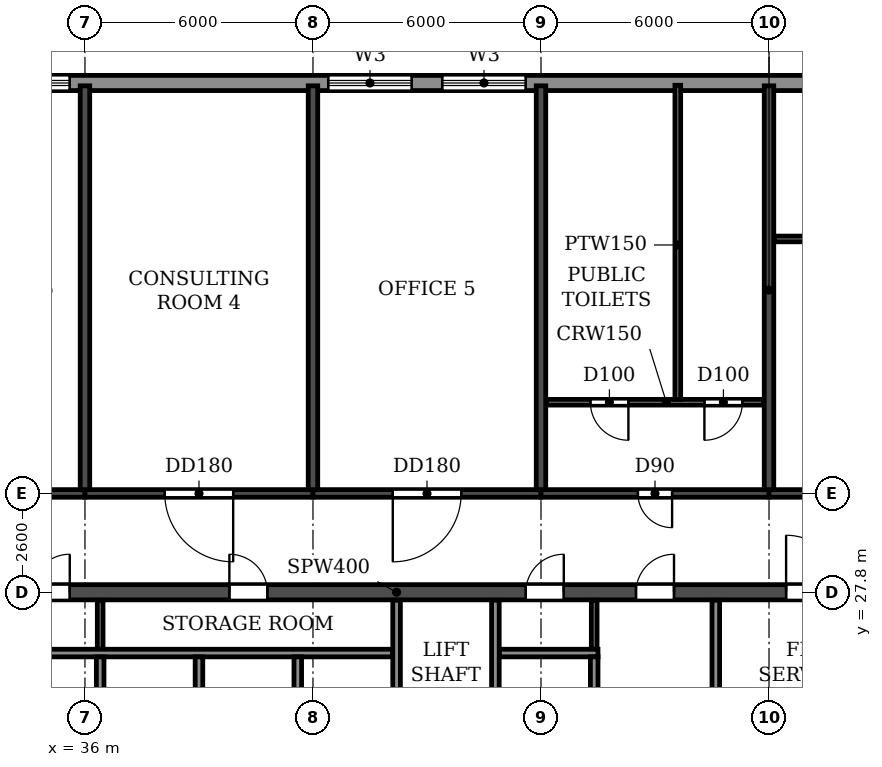
"""IFC4 building model, lengths in metres.
Left out: names, types, materials, properties, quantities, classifications, styles, units other than length and angle.
Written with IfcOpenShell. Run it as: python <this file> out.ifc"""

import sys

from ifc_helpers import new_model, si_unit, direction, frame, frame_2d, origin, place, context, subcontext, project, spatial, rectangle, extrude, element, fill, save


model = new_model("IFC4")
c1 = context("Model", 3, precision=1e-05, world=origin(), true_north=direction((0.0, 1.0)))
c2 = subcontext(c1, "Body", "Model", "MODEL_VIEW")
j1 = project(units=[si_unit("LENGTHUNIT", "METRE"), si_unit("PLANEANGLEUNIT", "RADIAN")], contexts=[c1])
p1 = place(None, origin())
s1 = spatial("IfcSite", under=j1, at=p1, CompositionType="ELEMENT")
p2 = place(p1, origin())
s2 = spatial("IfcBuilding", under=s1, at=p2, CompositionType="ELEMENT")
p3 = place(p2, frame((0.0, 0.0, 211.5)))
s3 = spatial("IfcBuildingStorey", under=s2, at=p3, CompositionType="ELEMENT", Elevation=211.5)
for number, where, z_axis, x_axis in (
    (1, (36.0, 30.5, 0.0), (0.0, 0.0, 1.0), (0.0, 1.0, 0.0)),
    (2, (42.0, 30.5, 0.0), (0.0, 0.0, 1.0), (0.0, 1.0, 0.0)),
    (3, (48.0, 30.5, 0.0), (0.0, 0.0, 1.0), (0.0, 1.0, 0.0)),
    (4, (54.0, 30.5, 0.0), (0.0, 0.0, 1.0), (0.0, 1.0, 0.0)),
):
    element("IfcWall", number, at=place(p3, frame(where, z_axis=z_axis, x_axis=x_axis)), inside=s3, PredefinedType="SHEAR", context=c2, shape_type="SweptSolid", body=[
        extrude(rectangle(XDim=10.625, YDim=0.25, at=frame_2d((5.312, 0.0))), origin(), (0.0, 0.0, 1.0), 2.95),
    ])
p4 = place(p3, frame((30.0, 30.4, 0.0), z_axis=(0.0, 0.0, 1.0), x_axis=(1.0, 0.0, 0.0)))
e5 = element("IfcWall", 5, at=p4, inside=s3, PredefinedType="SHEAR", context=c2, shape_type="SweptSolid", body=[
    extrude(rectangle(XDim=6.0, YDim=0.2, at=frame_2d((3.0, 0.0))), origin(), (0.0, 0.0, 1.0), 2.35),
])
p5 = place(p4, frame((2.1, 0.0, 0.0)))
e6 = element("IfcOpeningElement", 6, at=p5, cuts=e5, PredefinedType="OPENING", context=c2, shape_type="SweptSolid", body=[
    extrude(rectangle(XDim=1.8, YDim=2.1, at=frame_2d((0.9, 1.05))), frame((0.0, 0.11, 0.0), z_axis=(0.0, -1.0, 0.0), x_axis=(1.0, 0.0, 0.0)), (0.0, 0.0, 1.0), 0.22),
])
p6 = place(p3, frame((36.0, 30.4, 0.0), z_axis=(0.0, 0.0, 1.0), x_axis=(1.0, 0.0, 0.0)))
e7 = element("IfcWall", 7, at=p6, inside=s3, PredefinedType="SHEAR", context=c2, shape_type="SweptSolid", body=[
    extrude(rectangle(XDim=6.0, YDim=0.2, at=frame_2d((3.0, 0.0))), origin(), (0.0, 0.0, 1.0), 2.35),
])
p7 = place(p6, frame((2.1, 0.0, 0.0)))
e8 = element("IfcOpeningElement", 8, at=p7, cuts=e7, PredefinedType="OPENING", context=c2, shape_type="SweptSolid", body=[
    extrude(rectangle(XDim=1.8, YDim=2.1, at=frame_2d((0.9, 1.05))), frame((0.0, 0.11, 0.0), z_axis=(0.0, -1.0, 0.0), x_axis=(1.0, 0.0, 0.0)), (0.0, 0.0, 1.0), 0.22),
])
p8 = place(p3, frame((42.0, 30.4, 0.0), z_axis=(0.0, 0.0, 1.0), x_axis=(1.0, 0.0, 0.0)))
e9 = element("IfcWall", 9, at=p8, inside=s3, PredefinedType="SHEAR", context=c2, shape_type="SweptSolid", body=[
    extrude(rectangle(XDim=6.0, YDim=0.2, at=frame_2d((3.0, 0.0))), origin(), (0.0, 0.0, 1.0), 2.35),
])
p9 = place(p8, frame((2.1, 0.0, 0.0)))
e10 = element("IfcOpeningElement", 10, at=p9, cuts=e9, PredefinedType="OPENING", context=c2, shape_type="SweptSolid", body=[
    extrude(rectangle(XDim=1.8, YDim=2.1, at=frame_2d((0.9, 1.05))), frame((0.0, 0.11, 0.0), z_axis=(0.0, -1.0, 0.0), x_axis=(1.0, 0.0, 0.0)), (0.0, 0.0, 1.0), 0.22),
])
p10 = place(p3, frame((48.0, 30.4, 0.0), z_axis=(0.0, 0.0, 1.0), x_axis=(1.0, 0.0, 0.0)))
e11 = element("IfcWall", 11, at=p10, inside=s3, PredefinedType="SHEAR", context=c2, shape_type="SweptSolid", body=[
    extrude(rectangle(XDim=6.0, YDim=0.2, at=frame_2d((3.0, 0.0))), origin(), (0.0, 0.0, 1.0), 2.35),
])
p11 = place(p10, frame((2.55, 0.0, 0.0)))
e12 = element("IfcOpeningElement", 12, at=p11, cuts=e11, PredefinedType="OPENING", context=c2, shape_type="SweptSolid", body=[
    extrude(rectangle(XDim=0.9, YDim=2.1, at=frame_2d((0.45, 1.05))), frame((0.0, 0.11, 0.0), z_axis=(0.0, -1.0, 0.0), x_axis=(1.0, 0.0, 0.0)), (0.0, 0.0, 1.0), 0.22),
])
p12 = place(p3, frame((54.0, 30.4, 0.0), z_axis=(0.0, 0.0, 1.0), x_axis=(1.0, 0.0, 0.0)))
e13 = element("IfcWall", 13, at=p12, inside=s3, PredefinedType="SHEAR", context=c2, shape_type="SweptSolid", body=[
    extrude(rectangle(XDim=6.0, YDim=0.2, at=frame_2d((3.0, 0.0))), origin(), (0.0, 0.0, 1.0), 2.35),
])
p13 = place(p12, frame((2.5, 0.0, 0.0)))
e14 = element("IfcOpeningElement", 14, at=p13, cuts=e13, PredefinedType="OPENING", context=c2, shape_type="SweptSolid", body=[
    extrude(rectangle(XDim=1.0, YDim=2.1, at=frame_2d((0.5, 1.05))), frame((0.0, 0.11, 0.0), z_axis=(0.0, -1.0, 0.0), x_axis=(1.0, 0.0, 0.0)), (0.0, 0.0, 1.0), 0.22),
])
p14 = place(p3, frame((18.2, 27.8, 0.0), z_axis=(0.0, 0.0, 1.0), x_axis=(1.0, 0.0, 0.0)))
e15 = element("IfcWall", 15, at=p14, inside=s3, PredefinedType="SOLIDWALL", context=c2, shape_type="SweptSolid", body=[
    extrude(rectangle(XDim=65.6, YDim=0.4, at=frame_2d((32.8, 0.0))), origin(), (0.0, 0.0, 1.0), 2.95),
])
p15 = place(p14, frame((0.7, 0.0, 0.0)))
e16 = element("IfcOpeningElement", 16, at=p15, cuts=e15, PredefinedType="OPENING", context=c2, shape_type="SweptSolid", body=[
    extrude(rectangle(XDim=1.0, YDim=2.1, at=frame_2d((0.5, 1.05))), frame((0.0, 0.21, 0.0), z_axis=(0.0, -1.0, 0.0), x_axis=(1.0, 0.0, 0.0)), (0.0, 0.0, 1.0), 0.42),
])
p16 = place(p14, frame((4.05, 0.0, 0.0)))
e17 = element("IfcOpeningElement", 17, at=p16, cuts=e15, PredefinedType="OPENING", context=c2, shape_type="SweptSolid", body=[
    extrude(rectangle(XDim=0.9, YDim=2.1, at=frame_2d((0.45, 1.05))), frame((0.0, 0.21, 0.0), z_axis=(0.0, -1.0, 0.0), x_axis=(1.0, 0.0, 0.0)), (0.0, 0.0, 1.0), 0.42),
])
p17 = place(p14, frame((8.65, 0.0, 0.0)))
e18 = element("IfcOpeningElement", 18, at=p17, cuts=e15, PredefinedType="OPENING", context=c2, shape_type="SweptSolid", body=[
    extrude(rectangle(XDim=0.9, YDim=2.1, at=frame_2d((0.45, 1.05))), frame((0.0, 0.21, 0.0), z_axis=(0.0, -1.0, 0.0), x_axis=(1.0, 0.0, 0.0)), (0.0, 0.0, 1.0), 0.42),
])
p18 = place(p14, frame((13.25, 0.0, 0.0)))
e19 = element("IfcOpeningElement", 19, at=p18, cuts=e15, PredefinedType="OPENING", context=c2, shape_type="SweptSolid", body=[
    extrude(rectangle(XDim=0.9, YDim=2.1, at=frame_2d((0.45, 1.05))), frame((0.0, 0.21, 0.0), z_axis=(0.0, -1.0, 0.0), x_axis=(1.0, 0.0, 0.0)), (0.0, 0.0, 1.0), 0.42),
])
p19 = place(p14, frame((16.4, 0.0, 0.0)))
e20 = element("IfcOpeningElement", 20, at=p19, cuts=e15, PredefinedType="OPENING", context=c2, shape_type="SweptSolid", body=[
    extrude(rectangle(XDim=1.0, YDim=2.1, at=frame_2d((0.5, 1.05))), frame((0.0, 0.21, 0.0), z_axis=(0.0, -1.0, 0.0), x_axis=(1.0, 0.0, 0.0)), (0.0, 0.0, 1.0), 0.42),
])
p20 = place(p14, frame((21.6, 0.0, 0.0)))
e21 = element("IfcOpeningElement", 21, at=p20, cuts=e15, PredefinedType="OPENING", context=c2, shape_type="SweptSolid", body=[
    extrude(rectangle(XDim=1.0, YDim=2.1, at=frame_2d((0.5, 1.05))), frame((0.0, 0.21, 0.0), z_axis=(0.0, -1.0, 0.0), x_axis=(1.0, 0.0, 0.0)), (0.0, 0.0, 1.0), 0.42),
])
p21 = place(p14, frame((29.4, 0.0, 0.0)))
e22 = element("IfcOpeningElement", 22, at=p21, cuts=e15, PredefinedType="OPENING", context=c2, shape_type="SweptSolid", body=[
    extrude(rectangle(XDim=1.0, YDim=2.1, at=frame_2d((0.5, 1.05))), frame((0.0, 0.21, 0.0), z_axis=(0.0, -1.0, 0.0), x_axis=(1.0, 0.0, 0.0)), (0.0, 0.0, 1.0), 0.42),
])
p22 = place(p14, frame((32.3, 0.0, 0.0)))
e23 = element("IfcOpeningElement", 23, at=p22, cuts=e15, PredefinedType="OPENING", context=c2, shape_type="SweptSolid", body=[
    extrude(rectangle(XDim=1.0, YDim=2.1, at=frame_2d((0.5, 1.05))), frame((0.0, 0.21, 0.0), z_axis=(0.0, -1.0, 0.0), x_axis=(1.0, 0.0, 0.0)), (0.0, 0.0, 1.0), 0.42),
])
p23 = place(p14, frame((36.25, 0.0, 0.0)))
e24 = element("IfcOpeningElement", 24, at=p23, cuts=e15, PredefinedType="OPENING", context=c2, shape_type="SweptSolid", body=[
    extrude(rectangle(XDim=1.5, YDim=2.1, at=frame_2d((0.75, 1.05))), frame((0.0, 0.21, 0.0), z_axis=(0.0, -1.0, 0.0), x_axis=(1.0, 0.0, 0.0)), (0.0, 0.0, 1.0), 0.42),
])
p24 = place(p14, frame((41.7, 0.0, 0.0)))
e25 = element("IfcOpeningElement", 25, at=p24, cuts=e15, PredefinedType="OPENING", context=c2, shape_type="SweptSolid", body=[
    extrude(rectangle(XDim=1.0, YDim=2.1, at=frame_2d((0.5, 1.05))), frame((0.0, 0.21, 0.0), z_axis=(0.0, -1.0, 0.0), x_axis=(1.0, 0.0, 0.0)), (0.0, 0.0, 1.0), 0.42),
])
p25 = place(p14, frame((45.6, 0.0, 0.0)))
e26 = element("IfcOpeningElement", 26, at=p25, cuts=e15, PredefinedType="OPENING", context=c2, shape_type="SweptSolid", body=[
    extrude(rectangle(XDim=1.0, YDim=2.1, at=frame_2d((0.5, 1.05))), frame((0.0, 0.21, 0.0), z_axis=(0.0, -1.0, 0.0), x_axis=(1.0, 0.0, 0.0)), (0.0, 0.0, 1.0), 0.42),
])
p26 = place(p14, frame((48.2, 0.0, 0.0)))
e27 = element("IfcOpeningElement", 27, at=p26, cuts=e15, PredefinedType="OPENING", context=c2, shape_type="SweptSolid", body=[
    extrude(rectangle(XDim=1.0, YDim=2.1, at=frame_2d((0.5, 1.05))), frame((0.0, 0.21, 0.0), z_axis=(0.0, -1.0, 0.0), x_axis=(1.0, 0.0, 0.0)), (0.0, 0.0, 1.0), 0.42),
])
p27 = place(p14, frame((51.45, 0.0, 0.0)))
e28 = element("IfcOpeningElement", 28, at=p27, cuts=e15, PredefinedType="OPENING", context=c2, shape_type="SweptSolid", body=[
    extrude(rectangle(XDim=0.9, YDim=2.1, at=frame_2d((0.45, 1.05))), frame((0.0, 0.21, 0.0), z_axis=(0.0, -1.0, 0.0), x_axis=(1.0, 0.0, 0.0)), (0.0, 0.0, 1.0), 0.42),
])
p28 = place(p14, frame((56.05, 0.0, 0.0)))
e29 = element("IfcOpeningElement", 29, at=p28, cuts=e15, PredefinedType="OPENING", context=c2, shape_type="SweptSolid", body=[
    extrude(rectangle(XDim=0.9, YDim=2.1, at=frame_2d((0.45, 1.05))), frame((0.0, 0.21, 0.0), z_axis=(0.0, -1.0, 0.0), x_axis=(1.0, 0.0, 0.0)), (0.0, 0.0, 1.0), 0.42),
])
p29 = place(p14, frame((60.65, 0.0, 0.0)))
e30 = element("IfcOpeningElement", 30, at=p29, cuts=e15, PredefinedType="OPENING", context=c2, shape_type="SweptSolid", body=[
    extrude(rectangle(XDim=0.9, YDim=2.1, at=frame_2d((0.45, 1.05))), frame((0.0, 0.21, 0.0), z_axis=(0.0, -1.0, 0.0), x_axis=(1.0, 0.0, 0.0)), (0.0, 0.0, 1.0), 0.42),
])
p30 = place(p14, frame((63.9, 0.0, 0.0)))
e31 = element("IfcOpeningElement", 31, at=p30, cuts=e15, PredefinedType="OPENING", context=c2, shape_type="SweptSolid", body=[
    extrude(rectangle(XDim=1.0, YDim=2.1, at=frame_2d((0.5, 1.05))), frame((0.0, 0.21, 0.0), z_axis=(0.0, -1.0, 0.0), x_axis=(1.0, 0.0, 0.0)), (0.0, 0.0, 1.0), 0.42),
])
p31 = place(p3, frame((66.0, 41.2, 0.0), z_axis=(0.0, 0.0, 1.0), x_axis=(-1.0, 0.0, 0.0)))
e32 = element("IfcWall", 32, at=p31, inside=s3, PredefinedType="STANDARD", context=c2, shape_type="SweptSolid", body=[
    extrude(rectangle(XDim=36.0, YDim=0.4, at=frame_2d((18.0, 0.0))), origin(), (0.0, 0.0, 1.0), 2.95),
])
p32 = place(p31, frame((33.4, 0.0, 0.6)))
e33 = element("IfcOpeningElement", 33, at=p32, cuts=e32, PredefinedType="OPENING", context=c2, shape_type="SweptSolid", body=[
    extrude(rectangle(XDim=2.2, YDim=1.8, at=frame_2d((1.1, 0.9))), frame((0.0, 0.21, 0.0), z_axis=(0.0, -1.0, 0.0), x_axis=(1.0, 0.0, 0.0)), (0.0, 0.0, 1.0), 0.42),
])
p33 = place(p31, frame((30.4, 0.0, 0.6)))
e34 = element("IfcOpeningElement", 34, at=p33, cuts=e32, PredefinedType="OPENING", context=c2, shape_type="SweptSolid", body=[
    extrude(rectangle(XDim=2.2, YDim=1.8, at=frame_2d((1.1, 0.9))), frame((0.0, 0.21, 0.0), z_axis=(0.0, -1.0, 0.0), x_axis=(1.0, 0.0, 0.0)), (0.0, 0.0, 1.0), 0.42),
])
p34 = place(p31, frame((21.4, 0.0, 0.6)))
e35 = element("IfcOpeningElement", 35, at=p34, cuts=e32, PredefinedType="OPENING", context=c2, shape_type="SweptSolid", body=[
    extrude(rectangle(XDim=2.2, YDim=1.8, at=frame_2d((1.1, 0.9))), frame((0.0, 0.21, 0.0), z_axis=(0.0, -1.0, 0.0), x_axis=(1.0, 0.0, 0.0)), (0.0, 0.0, 1.0), 0.42),
])
p35 = place(p31, frame((18.4, 0.0, 0.6)))
e36 = element("IfcOpeningElement", 36, at=p35, cuts=e32, PredefinedType="OPENING", context=c2, shape_type="SweptSolid", body=[
    extrude(rectangle(XDim=2.2, YDim=1.8, at=frame_2d((1.1, 0.9))), frame((0.0, 0.21, 0.0), z_axis=(0.0, -1.0, 0.0), x_axis=(1.0, 0.0, 0.0)), (0.0, 0.0, 1.0), 0.42),
])
p36 = place(p3, frame((48.135, 32.8, 0.0), z_axis=(0.0, 0.0, 1.0), x_axis=(1.0, 0.0, 0.0)))
e37 = element("IfcWall", 37, at=p36, inside=s3, PredefinedType="PARTITIONING", context=c2, shape_type="SweptSolid", body=[
    extrude(rectangle(XDim=5.73, YDim=0.15, at=frame_2d((2.865, 0.0))), origin(), (0.0, 0.0, 1.0), 2.95),
])
p37 = place(p36, frame((1.165, 0.0, 0.0)))
e38 = element("IfcOpeningElement", 38, at=p37, cuts=e37, PredefinedType="OPENING", context=c2, shape_type="SweptSolid", body=[
    extrude(rectangle(XDim=1.0, YDim=2.1, at=frame_2d((0.5, 1.05))), frame((0.0, 0.085, 0.0), z_axis=(0.0, -1.0, 0.0), x_axis=(1.0, 0.0, 0.0)), (0.0, 0.0, 1.0), 0.17),
])
p38 = place(p36, frame((4.165, 0.0, 0.0)))
e39 = element("IfcOpeningElement", 39, at=p38, cuts=e37, PredefinedType="OPENING", context=c2, shape_type="SweptSolid", body=[
    extrude(rectangle(XDim=1.0, YDim=2.1, at=frame_2d((0.5, 1.05))), frame((0.0, 0.085, 0.0), z_axis=(0.0, -1.0, 0.0), x_axis=(1.0, 0.0, 0.0)), (0.0, 0.0, 1.0), 0.17),
])
p39 = place(p3, frame((49.4, 26.3, 0.0), z_axis=(0.0, 0.0, 1.0), x_axis=(0.0, 1.0, 0.0)))
e40 = element("IfcWall", 40, at=p39, inside=s3, PredefinedType="PARTITIONING", context=c2, shape_type="SweptSolid", body=[
    extrude(rectangle(XDim=1.29, YDim=0.15, at=frame_2d((0.645, 0.0))), origin(), (0.0, 0.0, 1.0), 2.95),
])
p40 = place(p3, frame((54.135, 37.096, 0.0), z_axis=(0.0, 0.0, 1.0), x_axis=(1.0, 0.0, 0.0)))
e41 = element("IfcWall", 41, at=p40, inside=s3, PredefinedType="PARTITIONING", context=c2, shape_type="SweptSolid", body=[
    extrude(rectangle(XDim=5.73, YDim=0.15, at=frame_2d((2.865, 0.0))), origin(), (0.0, 0.0, 1.0), 2.95),
])
p41 = place(p40, frame((2.465, 0.0, 0.0)))
e42 = element("IfcOpeningElement", 42, at=p41, cuts=e41, PredefinedType="OPENING", context=c2, shape_type="SweptSolid", body=[
    extrude(rectangle(XDim=0.8, YDim=2.1, at=frame_2d((0.4, 1.05))), frame((0.0, 0.085, 0.0), z_axis=(0.0, -1.0, 0.0), x_axis=(1.0, 0.0, 0.0)), (0.0, 0.0, 1.0), 0.17),
])
p42 = place(p3, frame((36.4, 26.3, 0.0), z_axis=(0.0, 0.0, 1.0), x_axis=(0.0, 1.0, 0.0)))
e43 = element("IfcWall", 43, at=p42, inside=s3, PredefinedType="PARTITIONING", context=c2, shape_type="SweptSolid", body=[
    extrude(rectangle(XDim=1.29, YDim=0.15, at=frame_2d((0.645, 0.0))), origin(), (0.0, 0.0, 1.0), 2.95),
])
p43 = place(p3, frame((51.6, 32.875, 0.0), z_axis=(0.0, 0.0, 1.0), x_axis=(0.0, 1.0, 0.0)))
e44 = element("IfcWall", 44, at=p43, inside=s3, PredefinedType="PARTITIONING", context=c2, shape_type="SweptSolid", body=[
    extrude(rectangle(XDim=8.265, YDim=0.15, at=frame_2d((4.132, 0.0))), origin(), (0.0, 0.0, 1.0), 2.95),
])
p44 = place(p3, frame((52.6, 23.61, 0.0), z_axis=(0.0, 0.0, 1.0), x_axis=(0.0, 1.0, 0.0)))
e45 = element("IfcWall", 45, at=p44, inside=s3, PredefinedType="PARTITIONING", context=c2, shape_type="SweptSolid", body=[
    extrude(rectangle(XDim=3.98, YDim=0.2, at=frame_2d((1.99, 0.0))), origin(), (0.0, 0.0, 1.0), 2.95),
])
p45 = place(p3, frame((33.7, 26.2, 0.0), z_axis=(0.0, 0.0, 1.0), x_axis=(1.0, 0.0, 0.0)))
e46 = element("IfcWall", 46, at=p45, inside=s3, PredefinedType="PARTITIONING", context=c2, shape_type="SweptSolid", body=[
    extrude(rectangle(XDim=10.4, YDim=0.2, at=frame_2d((5.2, 0.0))), origin(), (0.0, 0.0, 1.0), 2.95),
])
p46 = place(p3, frame((46.9, 26.2, 0.0), z_axis=(0.0, 0.0, 1.0), x_axis=(1.0, 0.0, 0.0)))
e47 = element("IfcWall", 47, at=p46, inside=s3, PredefinedType="PARTITIONING", context=c2, shape_type="SweptSolid", body=[
    extrude(rectangle(XDim=2.6, YDim=0.2, at=frame_2d((1.3, 0.0))), origin(), (0.0, 0.0, 1.0), 2.95),
])
for number, where, z_axis, x_axis in (
    (48, (36.4, 23.61, 0.0), (0.0, 0.0, 1.0), (0.0, 1.0, 0.0)),
    (49, (39.0, 23.61, 0.0), (0.0, 0.0, 1.0), (0.0, 1.0, 0.0)),
    (50, (41.6, 23.61, 0.0), (0.0, 0.0, 1.0), (0.0, 1.0, 0.0)),
):
    element("IfcWall", number, at=place(p3, frame(where, z_axis=z_axis, x_axis=x_axis)), inside=s3, PredefinedType="PARTITIONING", context=c2, shape_type="SweptSolid", body=[
        extrude(rectangle(XDim=2.49, YDim=0.2, at=frame_2d((1.245, 0.0))), origin(), (0.0, 0.0, 1.0), 2.95),
    ])
for number, where, z_axis, x_axis in (
    (51, (44.2, 23.61, 0.0), (0.0, 0.0, 1.0), (0.0, 1.0, 0.0)),
    (52, (46.8, 23.61, 0.0), (0.0, 0.0, 1.0), (0.0, 1.0, 0.0)),
):
    element("IfcWall", number, at=place(p3, frame(where, z_axis=z_axis, x_axis=x_axis)), inside=s3, PredefinedType="PARTITIONING", context=c2, shape_type="SweptSolid", body=[
        extrude(rectangle(XDim=3.98, YDim=0.2, at=frame_2d((1.99, 0.0))), origin(), (0.0, 0.0, 1.0), 2.95),
    ])
p47 = place(p3, frame((49.4, 23.61, 0.0), z_axis=(0.0, 0.0, 1.0), x_axis=(0.0, 1.0, 0.0)))
e53 = element("IfcWall", 53, at=p47, inside=s3, PredefinedType="PARTITIONING", context=c2, shape_type="SweptSolid", body=[
    extrude(rectangle(XDim=2.49, YDim=0.2, at=frame_2d((1.245, 0.0))), origin(), (0.0, 0.0, 1.0), 2.95),
])
p48 = place(p33, origin())
e54 = element("IfcWindow", 54, at=p48, inside=s3, PartitioningType="DOUBLE_PANEL_HORIZONTAL", PredefinedType="WINDOW", context=c2, shape_type="SweptSolid", body=[
    extrude(rectangle(XDim=2.2, YDim=1.8, at=frame_2d((1.1, 0.9))), frame((0.0, 0.03, 0.0), z_axis=(0.0, -1.0, 0.0), x_axis=(1.0, 0.0, 0.0)), (0.0, 0.0, 1.0), 0.06),
])
fill(e34, e54)
p49 = place(p34, origin())
e55 = element("IfcWindow", 55, at=p49, inside=s3, PartitioningType="DOUBLE_PANEL_HORIZONTAL", PredefinedType="WINDOW", context=c2, shape_type="SweptSolid", body=[
    extrude(rectangle(XDim=2.2, YDim=1.8, at=frame_2d((1.1, 0.9))), frame((0.0, 0.03, 0.0), z_axis=(0.0, -1.0, 0.0), x_axis=(1.0, 0.0, 0.0)), (0.0, 0.0, 1.0), 0.06),
])
fill(e35, e55)
p50 = place(p35, origin())
e56 = element("IfcWindow", 56, at=p50, inside=s3, PartitioningType="DOUBLE_PANEL_HORIZONTAL", PredefinedType="WINDOW", context=c2, shape_type="SweptSolid", body=[
    extrude(rectangle(XDim=2.2, YDim=1.8, at=frame_2d((1.1, 0.9))), frame((0.0, 0.03, 0.0), z_axis=(0.0, -1.0, 0.0), x_axis=(1.0, 0.0, 0.0)), (0.0, 0.0, 1.0), 0.06),
])
fill(e36, e56)
p51 = place(p19, origin())
e57 = element("IfcDoor", 57, at=p51, inside=s3, OperationType="SINGLE_SWING_RIGHT", PredefinedType="DOOR", context=c2, shape_type="SweptSolid", body=[
    extrude(rectangle(XDim=1.0, YDim=2.1, at=frame_2d((0.5, 1.05))), frame((0.0, 0.025, 0.0), z_axis=(0.0, -1.0, 0.0), x_axis=(1.0, 0.0, 0.0)), (0.0, 0.0, 1.0), 0.05),
])
fill(e20, e57)
p52 = place(p7, frame((1.8, 0.0, 0.0), z_axis=(0.0, 0.0, 1.0), x_axis=(-1.0, 0.0, 0.0)))
e58 = element("IfcDoor", 58, at=p52, inside=s3, OperationType="DOUBLE_DOOR_SINGLE_SWING", PredefinedType="DOOR", context=c2, shape_type="SweptSolid", body=[
    extrude(rectangle(XDim=1.8, YDim=2.1, at=frame_2d((0.9, 1.05))), frame((0.0, 0.025, 0.0), z_axis=(0.0, -1.0, 0.0), x_axis=(1.0, 0.0, 0.0)), (0.0, 0.0, 1.0), 0.05),
])
fill(e8, e58)
p53 = place(p20, origin())
e59 = element("IfcDoor", 59, at=p53, inside=s3, OperationType="SINGLE_SWING_LEFT", PredefinedType="DOOR", context=c2, shape_type="SweptSolid", body=[
    extrude(rectangle(XDim=1.0, YDim=2.1, at=frame_2d((0.5, 1.05))), frame((0.0, 0.025, 0.0), z_axis=(0.0, -1.0, 0.0), x_axis=(1.0, 0.0, 0.0)), (0.0, 0.0, 1.0), 0.05),
])
fill(e21, e59)
p54 = place(p9, frame((1.8, 0.0, 0.0), z_axis=(0.0, 0.0, 1.0), x_axis=(-1.0, 0.0, 0.0)))
e60 = element("IfcDoor", 60, at=p54, inside=s3, OperationType="DOUBLE_DOOR_SINGLE_SWING", PredefinedType="DOOR", context=c2, shape_type="SweptSolid", body=[
    extrude(rectangle(XDim=1.8, YDim=2.1, at=frame_2d((0.9, 1.05))), frame((0.0, 0.025, 0.0), z_axis=(0.0, -1.0, 0.0), x_axis=(1.0, 0.0, 0.0)), (0.0, 0.0, 1.0), 0.05),
])
fill(e10, e60)
p55 = place(p21, origin())
e61 = element("IfcDoor", 61, at=p55, inside=s3, OperationType="SINGLE_SWING_RIGHT", PredefinedType="DOOR", context=c2, shape_type="SweptSolid", body=[
    extrude(rectangle(XDim=1.0, YDim=2.1, at=frame_2d((0.5, 1.05))), frame((0.0, 0.025, 0.0), z_axis=(0.0, -1.0, 0.0), x_axis=(1.0, 0.0, 0.0)), (0.0, 0.0, 1.0), 0.05),
])
fill(e22, e61)
p56 = place(p22, origin())
e62 = element("IfcDoor", 62, at=p56, inside=s3, OperationType="SINGLE_SWING_RIGHT", PredefinedType="DOOR", context=c2, shape_type="SweptSolid", body=[
    extrude(rectangle(XDim=1.0, YDim=2.1, at=frame_2d((0.5, 1.05))), frame((0.0, 0.025, 0.0), z_axis=(0.0, -1.0, 0.0), x_axis=(1.0, 0.0, 0.0)), (0.0, 0.0, 1.0), 0.05),
])
fill(e23, e62)
p57 = place(p11, frame((0.9, 0.0, 0.0), z_axis=(0.0, 0.0, 1.0), x_axis=(-1.0, 0.0, 0.0)))
e63 = element("IfcDoor", 63, at=p57, inside=s3, OperationType="SINGLE_SWING_LEFT", PredefinedType="DOOR", context=c2, shape_type="SweptSolid", body=[
    extrude(rectangle(XDim=0.9, YDim=2.1, at=frame_2d((0.45, 1.05))), frame((0.0, 0.025, 0.0), z_axis=(0.0, -1.0, 0.0), x_axis=(1.0, 0.0, 0.0)), (0.0, 0.0, 1.0), 0.05),
])
fill(e12, e63)
p58 = place(p23, origin())
e64 = element("IfcDoor", 64, at=p58, inside=s3, OperationType="DOUBLE_DOOR_SINGLE_SWING", PredefinedType="DOOR", context=c2, shape_type="SweptSolid", body=[
    extrude(rectangle(XDim=1.5, YDim=2.1, at=frame_2d((0.75, 1.05))), frame((0.0, 0.025, 0.0), z_axis=(0.0, -1.0, 0.0), x_axis=(1.0, 0.0, 0.0)), (0.0, 0.0, 1.0), 0.05),
])
fill(e24, e64)
p59 = place(p37, frame((1.0, 0.0, 0.0), z_axis=(0.0, 0.0, 1.0), x_axis=(-1.0, 0.0, 0.0)))
e65 = element("IfcDoor", 65, at=p59, inside=s3, OperationType="SINGLE_SWING_LEFT", PredefinedType="DOOR", context=c2, shape_type="SweptSolid", body=[
    extrude(rectangle(XDim=1.0, YDim=2.1, at=frame_2d((0.5, 1.05))), frame((0.0, 0.025, 0.0), z_axis=(0.0, -1.0, 0.0), x_axis=(1.0, 0.0, 0.0)), (0.0, 0.0, 1.0), 0.05),
])
fill(e38, e65)
p60 = place(p38, frame((1.0, 0.0, 0.0), z_axis=(0.0, 0.0, 1.0), x_axis=(-1.0, 0.0, 0.0)))
e66 = element("IfcDoor", 66, at=p60, inside=s3, OperationType="SINGLE_SWING_RIGHT", PredefinedType="DOOR", context=c2, shape_type="SweptSolid", body=[
    extrude(rectangle(XDim=1.0, YDim=2.1, at=frame_2d((0.5, 1.05))), frame((0.0, 0.025, 0.0), z_axis=(0.0, -1.0, 0.0), x_axis=(1.0, 0.0, 0.0)), (0.0, 0.0, 1.0), 0.05),
])
fill(e39, e66)
save(model, sys.argv[1])
